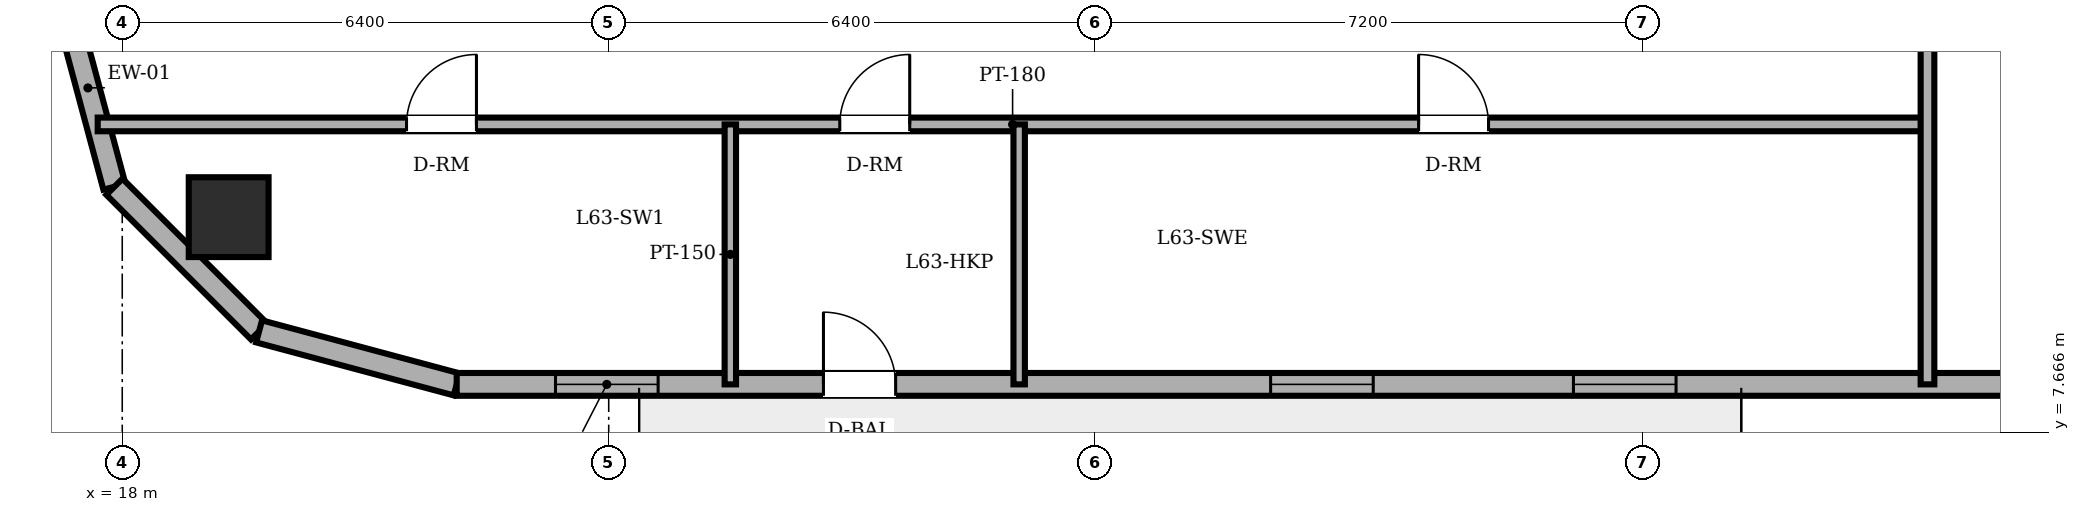
"""IFC4 building model, lengths in metres.
Left out: names, types, materials, properties, quantities, classifications, styles, units other than length and angle.
Written with IfcOpenShell. Run it as: python <this file> out.ifc"""

import sys

from ifc_helpers import new_model, si_unit, direction, frame, frame_2d, origin, origin_2d, place, context, subcontext, project, spatial, rectangle, circle, extrude, element, fill, save


model = new_model("IFC4")
c1 = context("Model", 3, precision=1e-05, world=origin(), true_north=direction((0.0, 1.0)))
c2 = subcontext(c1, "Body", "Model", "MODEL_VIEW")
j1 = project(units=[si_unit("LENGTHUNIT", "METRE"), si_unit("PLANEANGLEUNIT", "RADIAN")], contexts=[c1])
p1 = place(None, origin())
s1 = spatial("IfcSite", under=j1, at=p1, CompositionType="ELEMENT")
p2 = place(p1, origin())
s2 = spatial("IfcBuilding", under=s1, at=p2, CompositionType="ELEMENT")
p3 = place(p2, frame((0.0, 0.0, 240.9)))
s3 = spatial("IfcBuildingStorey", under=s2, at=p3, CompositionType="ELEMENT", Elevation=240.9)
p4 = place(p3, frame((19.4, 10.5, 0.0), z_axis=(0.0, 0.0, 1.0), x_axis=(1.0, 0.0, 0.0)))
e1 = element("IfcColumn", 1, at=p4, inside=s3, PredefinedType="COLUMN", context=c2, shape_type="SweptSolid", body=[
    extrude(circle(Radius=0.525, at=origin_2d()), origin(), (0.0, 0.0, 1.0), 3.6),
])
p5 = place(p3, frame((17.2, 13.5, 0.0), z_axis=(0.0, 0.0, 1.0), x_axis=(0.258932525951, -0.965895412042, 0.0)))
e2 = element("IfcWall", 2, at=p5, inside=s3, PredefinedType="SOLIDWALL", context=c2, shape_type="SweptSolid", body=[
    extrude(rectangle(XDim=2.692, YDim=0.3, at=frame_2d((1.346, 0.0))), origin(), (0.0, 0.0, 1.0), 3.4),
])
p6 = place(p3, frame((17.897, 10.9, 0.0), z_axis=(0.0, 0.0, 1.0), x_axis=(0.707152139074, -0.70706142039, 0.0)))
e3 = element("IfcWall", 3, at=p6, inside=s3, PredefinedType="SOLIDWALL", context=c2, shape_type="SweptSolid", body=[
    extrude(rectangle(XDim=2.691, YDim=0.3, at=frame_2d((1.346, 0.0))), origin(), (0.0, 0.0, 1.0), 3.4),
])
p7 = place(p3, frame((19.8, 8.997, 0.0), z_axis=(0.0, 0.0, 1.0), x_axis=(0.965889330541, -0.258955210695, 0.0)))
e4 = element("IfcWall", 4, at=p7, inside=s3, PredefinedType="SOLIDWALL", context=c2, shape_type="SweptSolid", body=[
    extrude(rectangle(XDim=2.692, YDim=0.3, at=frame_2d((1.346, 0.0))), origin(), (0.0, 0.0, 1.0), 3.4),
])
p8 = place(p3, frame((22.4, 8.3, 0.0), z_axis=(0.0, 0.0, 1.0), x_axis=(1.0, 0.0, 0.0)))
e5 = element("IfcWall", 5, at=p8, inside=s3, PredefinedType="SOLIDWALL", context=c2, shape_type="SweptSolid", body=[
    extrude(rectangle(XDim=32.485, YDim=0.3, at=frame_2d((16.243, 0.0))), origin(), (0.0, 0.0, 1.0), 3.4),
])
p9 = place(p8, frame((4.825, 0.0, 0.0)))
e6 = element("IfcOpeningElement", 6, at=p9, cuts=e5, PredefinedType="OPENING", context=c2, shape_type="SweptSolid", body=[
    extrude(rectangle(XDim=0.95, YDim=2.2, at=frame_2d((0.475, 1.1))), frame((0.0, 0.16, 0.0), z_axis=(0.0, -1.0, 0.0), x_axis=(1.0, 0.0, 0.0)), (0.0, 0.0, 1.0), 0.32),
])
p10 = place(p8, frame((1.3, 0.0, 0.85)))
e7 = element("IfcOpeningElement", 7, at=p10, cuts=e5, PredefinedType="OPENING", context=c2, shape_type="SweptSolid", body=[
    extrude(rectangle(XDim=1.35, YDim=1.55, at=frame_2d((0.675, 0.775))), frame((0.0, 0.16, 0.0), z_axis=(0.0, -1.0, 0.0), x_axis=(1.0, 0.0, 0.0)), (0.0, 0.0, 1.0), 0.32),
])
p11 = place(p8, frame((10.708, 0.0, 0.85)))
e8 = element("IfcOpeningElement", 8, at=p11, cuts=e5, PredefinedType="OPENING", context=c2, shape_type="SweptSolid", body=[
    extrude(rectangle(XDim=1.35, YDim=1.55, at=frame_2d((0.675, 0.775))), frame((0.0, 0.16, 0.0), z_axis=(0.0, -1.0, 0.0), x_axis=(1.0, 0.0, 0.0)), (0.0, 0.0, 1.0), 0.32),
])
p12 = place(p8, frame((14.692, 0.0, 0.85)))
e9 = element("IfcOpeningElement", 9, at=p12, cuts=e5, PredefinedType="OPENING", context=c2, shape_type="SweptSolid", body=[
    extrude(rectangle(XDim=1.35, YDim=1.55, at=frame_2d((0.675, 0.775))), frame((0.0, 0.16, 0.0), z_axis=(0.0, -1.0, 0.0), x_axis=(1.0, 0.0, 0.0)), (0.0, 0.0, 1.0), 0.32),
])
p13 = place(p8, frame((22.937, 0.0, 0.85)))
e10 = element("IfcOpeningElement", 10, at=p13, cuts=e5, PredefinedType="OPENING", context=c2, shape_type="SweptSolid", body=[
    extrude(rectangle(XDim=1.35, YDim=1.55, at=frame_2d((0.675, 0.775))), frame((0.0, 0.16, 0.0), z_axis=(0.0, -1.0, 0.0), x_axis=(1.0, 0.0, 0.0)), (0.0, 0.0, 1.0), 0.32),
])
p14 = place(p8, frame((27.198, 0.0, 0.85)))
e11 = element("IfcOpeningElement", 11, at=p14, cuts=e5, PredefinedType="OPENING", context=c2, shape_type="SweptSolid", body=[
    extrude(rectangle(XDim=1.35, YDim=1.55, at=frame_2d((0.675, 0.775))), frame((0.0, 0.16, 0.0), z_axis=(0.0, -1.0, 0.0), x_axis=(1.0, 0.0, 0.0)), (0.0, 0.0, 1.0), 0.32),
])
p15 = place(p3, frame((17.677, 11.72, 0.0), z_axis=(0.0, 0.0, 1.0), x_axis=(1.0, 0.0, 0.0)))
e12 = element("IfcWall", 12, at=p15, inside=s3, PredefinedType="PARTITIONING", context=c2, shape_type="SweptSolid", body=[
    extrude(rectangle(XDim=24.073, YDim=0.18, at=frame_2d((12.037, 0.0))), origin(), (0.0, 0.0, 1.0), 3.4),
])
p16 = place(p15, frame((9.763, 0.0, 0.0)))
e13 = element("IfcOpeningElement", 13, at=p16, cuts=e12, PredefinedType="OPENING", context=c2, shape_type="SweptSolid", body=[
    extrude(rectangle(XDim=0.92, YDim=2.1, at=frame_2d((0.46, 1.05))), frame((0.0, 0.1, 0.0), z_axis=(0.0, -1.0, 0.0), x_axis=(1.0, 0.0, 0.0)), (0.0, 0.0, 1.0), 0.2),
])
p17 = place(p15, frame((4.063, 0.0, 0.0)))
e14 = element("IfcOpeningElement", 14, at=p17, cuts=e12, PredefinedType="OPENING", context=c2, shape_type="SweptSolid", body=[
    extrude(rectangle(XDim=0.92, YDim=2.1, at=frame_2d((0.46, 1.05))), frame((0.0, 0.1, 0.0), z_axis=(0.0, -1.0, 0.0), x_axis=(1.0, 0.0, 0.0)), (0.0, 0.0, 1.0), 0.2),
])
p18 = place(p15, frame((17.378, 0.0, 0.0)))
e15 = element("IfcOpeningElement", 15, at=p18, cuts=e12, PredefinedType="OPENING", context=c2, shape_type="SweptSolid", body=[
    extrude(rectangle(XDim=0.92, YDim=2.1, at=frame_2d((0.46, 1.05))), frame((0.0, 0.1, 0.0), z_axis=(0.0, -1.0, 0.0), x_axis=(1.0, 0.0, 0.0)), (0.0, 0.0, 1.0), 0.2),
])
for number, where, z_axis, x_axis in (
    (16, (26.0, 8.3, 0.0), (0.0, 0.0, 1.0), (0.0, 1.0, 0.0)),
    (17, (29.8, 8.3, 0.0), (0.0, 0.0, 1.0), (0.0, 1.0, 0.0)),
):
    element("IfcWall", number, at=place(p3, frame(where, z_axis=z_axis, x_axis=x_axis)), inside=s3, PredefinedType="PARTITIONING", context=c2, shape_type="SweptSolid", body=[
        extrude(rectangle(XDim=3.42, YDim=0.15, at=frame_2d((1.71, 0.0))), origin(), (0.0, 0.0, 1.0), 3.4),
    ])
p19 = place(p3, frame((41.75, 8.3, 0.0), z_axis=(0.0, 0.0, 1.0), x_axis=(0.0, 1.0, 0.0)))
e18 = element("IfcWall", 18, at=p19, inside=s3, PredefinedType="PARTITIONING", context=c2, shape_type="SweptSolid", body=[
    extrude(rectangle(XDim=14.52, YDim=0.18, at=frame_2d((7.26, 0.0))), origin(), (0.0, 0.0, 1.0), 3.4),
])
p20 = place(p9, origin())
e19 = element("IfcDoor", 19, at=p20, inside=s3, OperationType="SINGLE_SWING_LEFT", PredefinedType="DOOR", context=c2, shape_type="SweptSolid", body=[
    extrude(rectangle(XDim=0.95, YDim=2.2, at=frame_2d((0.475, 1.1))), frame((0.0, 0.025, 0.0), z_axis=(0.0, -1.0, 0.0), x_axis=(1.0, 0.0, 0.0)), (0.0, 0.0, 1.0), 0.05),
])
fill(e6, e19)
p21 = place(p10, origin())
e20 = element("IfcWindow", 20, at=p21, inside=s3, PartitioningType="SINGLE_PANEL", PredefinedType="WINDOW", context=c2, shape_type="SweptSolid", body=[
    extrude(rectangle(XDim=1.35, YDim=1.55, at=frame_2d((0.675, 0.775))), frame((0.0, 0.03, 0.0), z_axis=(0.0, -1.0, 0.0), x_axis=(1.0, 0.0, 0.0)), (0.0, 0.0, 1.0), 0.06),
])
fill(e7, e20)
p22 = place(p11, origin())
e21 = element("IfcWindow", 21, at=p22, inside=s3, PartitioningType="SINGLE_PANEL", PredefinedType="WINDOW", context=c2, shape_type="SweptSolid", body=[
    extrude(rectangle(XDim=1.35, YDim=1.55, at=frame_2d((0.675, 0.775))), frame((0.0, 0.03, 0.0), z_axis=(0.0, -1.0, 0.0), x_axis=(1.0, 0.0, 0.0)), (0.0, 0.0, 1.0), 0.06),
])
fill(e8, e21)
p23 = place(p12, origin())
e22 = element("IfcWindow", 22, at=p23, inside=s3, PartitioningType="SINGLE_PANEL", PredefinedType="WINDOW", context=c2, shape_type="SweptSolid", body=[
    extrude(rectangle(XDim=1.35, YDim=1.55, at=frame_2d((0.675, 0.775))), frame((0.0, 0.03, 0.0), z_axis=(0.0, -1.0, 0.0), x_axis=(1.0, 0.0, 0.0)), (0.0, 0.0, 1.0), 0.06),
])
fill(e9, e22)
p24 = place(p16, origin())
e23 = element("IfcDoor", 23, at=p24, inside=s3, OperationType="SINGLE_SWING_RIGHT", PredefinedType="DOOR", context=c2, shape_type="SweptSolid", body=[
    extrude(rectangle(XDim=0.92, YDim=2.1, at=frame_2d((0.46, 1.05))), frame((0.0, 0.025, 0.0), z_axis=(0.0, -1.0, 0.0), x_axis=(1.0, 0.0, 0.0)), (0.0, 0.0, 1.0), 0.05),
])
fill(e13, e23)
p25 = place(p17, origin())
e24 = element("IfcDoor", 24, at=p25, inside=s3, OperationType="SINGLE_SWING_RIGHT", PredefinedType="DOOR", context=c2, shape_type="SweptSolid", body=[
    extrude(rectangle(XDim=0.92, YDim=2.1, at=frame_2d((0.46, 1.05))), frame((0.0, 0.025, 0.0), z_axis=(0.0, -1.0, 0.0), x_axis=(1.0, 0.0, 0.0)), (0.0, 0.0, 1.0), 0.05),
])
fill(e14, e24)
p26 = place(p18, origin())
e25 = element("IfcDoor", 25, at=p26, inside=s3, OperationType="SINGLE_SWING_LEFT", PredefinedType="DOOR", context=c2, shape_type="SweptSolid", body=[
    extrude(rectangle(XDim=0.92, YDim=2.1, at=frame_2d((0.46, 1.05))), frame((0.0, 0.025, 0.0), z_axis=(0.0, -1.0, 0.0), x_axis=(1.0, 0.0, 0.0)), (0.0, 0.0, 1.0), 0.05),
])
fill(e15, e25)
save(model, sys.argv[1])
